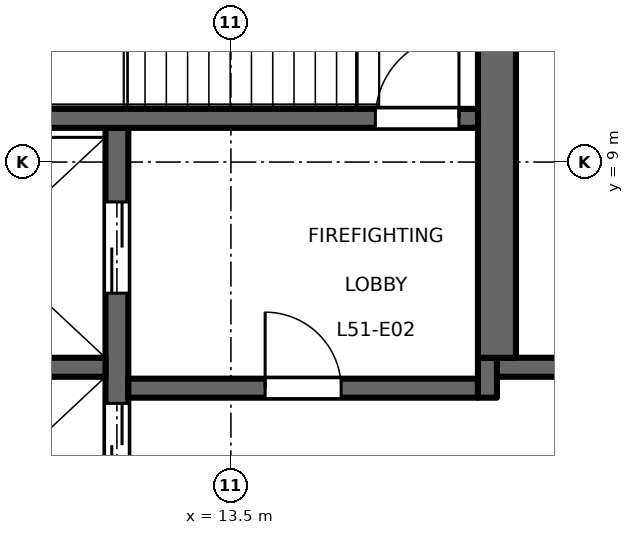
"""IFC4 building model, lengths in metres.
Left out: names, types, materials, properties, quantities, classifications, styles, units other than length and angle.
Written with IfcOpenShell. Run it as: python <this file> out.ifc"""

import sys

from ifc_helpers import new_model, si_unit, direction, frame, frame_2d, origin, place, context, subcontext, project, spatial, rectangle, extrude, element, fill, save


model = new_model("IFC4")
c1 = context("Model", 3, precision=1e-05, world=origin(), true_north=direction((0.0, 1.0)))
c2 = subcontext(c1, "Body", "Model", "MODEL_VIEW")
j1 = project(units=[si_unit("LENGTHUNIT", "METRE"), si_unit("PLANEANGLEUNIT", "RADIAN")], contexts=[c1])
p1 = place(None, origin())
s1 = spatial("IfcSite", under=j1, at=p1, CompositionType="ELEMENT")
p2 = place(p1, origin())
s2 = spatial("IfcBuilding", under=s1, at=p2, CompositionType="ELEMENT")
p3 = place(p2, frame((0.0, 0.0, 237.7)))
s3 = spatial("IfcBuildingStorey", under=s2, at=p3, CompositionType="ELEMENT", Elevation=237.7)
p4 = place(p3, frame((12.0, -9.45, 0.0), z_axis=(0.0, 0.0, 1.0), x_axis=(0.0, 1.0, 0.0)))
e1 = element("IfcWall", 1, at=p4, inside=s3, PredefinedType="SHEAR", context=c2, shape_type="SweptSolid", body=[
    extrude(rectangle(XDim=18.9, YDim=0.3, at=frame_2d((9.45, 0.0))), origin(), (0.0, 0.0, 1.0), 4.35),
])
p5 = place(p4, frame((4.725, 0.0, 0.0)))
e2 = element("IfcOpeningElement", 2, at=p5, cuts=e1, PredefinedType="OPENING", context=c2, shape_type="SweptSolid", body=[
    extrude(rectangle(XDim=1.1, YDim=2.1, at=frame_2d((0.55, 1.05))), frame((0.0, 0.16, 0.0), z_axis=(0.0, -1.0, 0.0), x_axis=(1.0, 0.0, 0.0)), (0.0, 0.0, 1.0), 0.32),
])
p6 = place(p4, frame((7.875, 0.0, 0.0)))
e3 = element("IfcOpeningElement", 3, at=p6, cuts=e1, PredefinedType="OPENING", context=c2, shape_type="SweptSolid", body=[
    extrude(rectangle(XDim=1.1, YDim=2.1, at=frame_2d((0.55, 1.05))), frame((0.0, 0.16, 0.0), z_axis=(0.0, -1.0, 0.0), x_axis=(1.0, 0.0, 0.0)), (0.0, 0.0, 1.0), 0.32),
])
p7 = place(p4, frame((11.025, 0.0, 0.0)))
e4 = element("IfcOpeningElement", 4, at=p7, cuts=e1, PredefinedType="OPENING", context=c2, shape_type="SweptSolid", body=[
    extrude(rectangle(XDim=1.1, YDim=2.1, at=frame_2d((0.55, 1.05))), frame((0.0, 0.16, 0.0), z_axis=(0.0, -1.0, 0.0), x_axis=(1.0, 0.0, 0.0)), (0.0, 0.0, 1.0), 0.32),
])
p8 = place(p4, frame((14.175, 0.0, 0.0)))
e5 = element("IfcOpeningElement", 5, at=p8, cuts=e1, PredefinedType="OPENING", context=c2, shape_type="SweptSolid", body=[
    extrude(rectangle(XDim=1.1, YDim=2.1, at=frame_2d((0.55, 1.05))), frame((0.0, 0.16, 0.0), z_axis=(0.0, -1.0, 0.0), x_axis=(1.0, 0.0, 0.0)), (0.0, 0.0, 1.0), 0.32),
])
p9 = place(p4, frame((16.725, 0.0, 0.0)))
e6 = element("IfcOpeningElement", 6, at=p9, cuts=e1, PredefinedType="OPENING", context=c2, shape_type="SweptSolid", body=[
    extrude(rectangle(XDim=1.2, YDim=2.1, at=frame_2d((0.6, 1.05))), frame((0.0, 0.16, 0.0), z_axis=(0.0, -1.0, 0.0), x_axis=(1.0, 0.0, 0.0)), (0.0, 0.0, 1.0), 0.32),
])
p10 = place(p4, frame((0.975, 0.0, 0.0)))
e7 = element("IfcOpeningElement", 7, at=p10, cuts=e1, PredefinedType="OPENING", context=c2, shape_type="SweptSolid", body=[
    extrude(rectangle(XDim=1.2, YDim=2.1, at=frame_2d((0.6, 1.05))), frame((0.0, 0.16, 0.0), z_axis=(0.0, -1.0, 0.0), x_axis=(1.0, 0.0, 0.0)), (0.0, 0.0, 1.0), 0.32),
])
p11 = place(p3, frame((12.15, 6.025, 0.0), z_axis=(0.0, 0.0, 1.0), x_axis=(1.0, 0.0, 0.0)))
e8 = element("IfcWall", 8, at=p11, inside=s3, PredefinedType="SHEAR", context=c2, shape_type="SweptSolid", body=[
    extrude(rectangle(XDim=4.6, YDim=0.25, at=frame_2d((2.3, 0.0))), origin(), (0.0, 0.0, 1.0), 4.35),
])
p12 = place(p11, frame((1.8, 0.0, 0.0)))
e9 = element("IfcOpeningElement", 9, at=p12, cuts=e8, PredefinedType="OPENING", context=c2, shape_type="SweptSolid", body=[
    extrude(rectangle(XDim=1.0, YDim=2.1, at=frame_2d((0.5, 1.05))), frame((0.0, 0.135, 0.0), z_axis=(0.0, -1.0, 0.0), x_axis=(1.0, 0.0, 0.0)), (0.0, 0.0, 1.0), 0.27),
])
p13 = place(p3, frame((16.875, 5.9, 0.0), z_axis=(0.0, 0.0, 1.0), x_axis=(0.0, 1.0, 0.0)))
e10 = element("IfcWall", 10, at=p13, inside=s3, PredefinedType="SHEAR", context=c2, shape_type="SweptSolid", body=[
    extrude(rectangle(XDim=0.525, YDim=0.25, at=frame_2d((0.263, 0.0))), origin(), (0.0, 0.0, 1.0), 4.35),
])
p14 = place(p3, frame((17.0, 6.3, 0.0), z_axis=(0.0, 0.0, 1.0), x_axis=(1.0, 0.0, 0.0)))
e11 = element("IfcWall", 11, at=p14, inside=s3, PredefinedType="SHEAR", context=c2, shape_type="SweptSolid", body=[
    extrude(rectangle(XDim=4.25, YDim=0.25, at=frame_2d((2.125, 0.0))), origin(), (0.0, 0.0, 1.0), 4.35),
])
p15 = place(p3, frame((17.0, 6.425, 0.0), z_axis=(0.0, 0.0, 1.0), x_axis=(0.0, 1.0, 0.0)))
e12 = element("IfcWall", 12, at=p15, inside=s3, PredefinedType="SHEAR", context=c2, shape_type="SweptSolid", body=[
    extrude(rectangle(XDim=6.575, YDim=0.5, at=frame_2d((3.288, 0.0))), origin(), (0.0, 0.0, 1.0), 4.35),
])
p16 = place(p3, frame((8.75, 6.3, 0.0), z_axis=(0.0, 0.0, 1.0), x_axis=(1.0, 0.0, 0.0)))
e13 = element("IfcWall", 13, at=p16, inside=s3, PredefinedType="SHEAR", context=c2, shape_type="SweptSolid", body=[
    extrude(rectangle(XDim=3.1, YDim=0.25, at=frame_2d((1.55, 0.0))), origin(), (0.0, 0.0, 1.0), 4.35),
])
p17 = place(p3, frame((8.75, 9.575, 0.0), z_axis=(0.0, 0.0, 1.0), x_axis=(1.0, 0.0, 0.0)))
e14 = element("IfcWall", 14, at=p17, inside=s3, PredefinedType="SHEAR", context=c2, shape_type="SweptSolid", body=[
    extrude(rectangle(XDim=8.0, YDim=0.25, at=frame_2d((4.0, 0.0))), origin(), (0.0, 0.0, 1.0), 4.35),
])
p18 = place(p17, frame((6.65, 0.0, 0.0)))
e15 = element("IfcOpeningElement", 15, at=p18, cuts=e14, PredefinedType="OPENING", context=c2, shape_type="SweptSolid", body=[
    extrude(rectangle(XDim=1.1, YDim=2.1, at=frame_2d((0.55, 1.05))), frame((0.0, 0.135, 0.0), z_axis=(0.0, -1.0, 0.0), x_axis=(1.0, 0.0, 0.0)), (0.0, 0.0, 1.0), 0.27),
])
p19 = place(p12, origin())
e16 = element("IfcDoor", 16, at=p19, inside=s3, OperationType="SINGLE_SWING_RIGHT", PredefinedType="DOOR", context=c2, shape_type="SweptSolid", body=[
    extrude(rectangle(XDim=1.0, YDim=2.1, at=frame_2d((0.5, 1.05))), frame((0.0, 0.025, 0.0), z_axis=(0.0, -1.0, 0.0), x_axis=(1.0, 0.0, 0.0)), (0.0, 0.0, 1.0), 0.05),
])
fill(e9, e16)
p20 = place(p18, origin())
e17 = element("IfcDoor", 17, at=p20, inside=s3, OperationType="SINGLE_SWING_LEFT", PredefinedType="DOOR", context=c2, shape_type="SweptSolid", body=[
    extrude(rectangle(XDim=1.1, YDim=2.1, at=frame_2d((0.55, 1.05))), frame((0.0, 0.025, 0.0), z_axis=(0.0, -1.0, 0.0), x_axis=(1.0, 0.0, 0.0)), (0.0, 0.0, 1.0), 0.05),
])
fill(e15, e17)
p21 = place(p8, origin())
e18 = element("IfcDoor", 18, at=p21, inside=s3, OperationType="DOUBLE_DOOR_SLIDING", PredefinedType="DOOR", context=c2, shape_type="SweptSolid", body=[
    extrude(rectangle(XDim=1.1, YDim=2.1, at=frame_2d((0.55, 1.05))), frame((0.0, 0.025, 0.0), z_axis=(0.0, -1.0, 0.0), x_axis=(1.0, 0.0, 0.0)), (0.0, 0.0, 1.0), 0.05),
])
fill(e5, e18)
p22 = place(p9, origin())
e19 = element("IfcDoor", 19, at=p22, inside=s3, OperationType="DOUBLE_DOOR_SLIDING", PredefinedType="DOOR", context=c2, shape_type="SweptSolid", body=[
    extrude(rectangle(XDim=1.2, YDim=2.1, at=frame_2d((0.6, 1.05))), frame((0.0, 0.025, 0.0), z_axis=(0.0, -1.0, 0.0), x_axis=(1.0, 0.0, 0.0)), (0.0, 0.0, 1.0), 0.05),
])
fill(e6, e19)
save(model, sys.argv[1])
